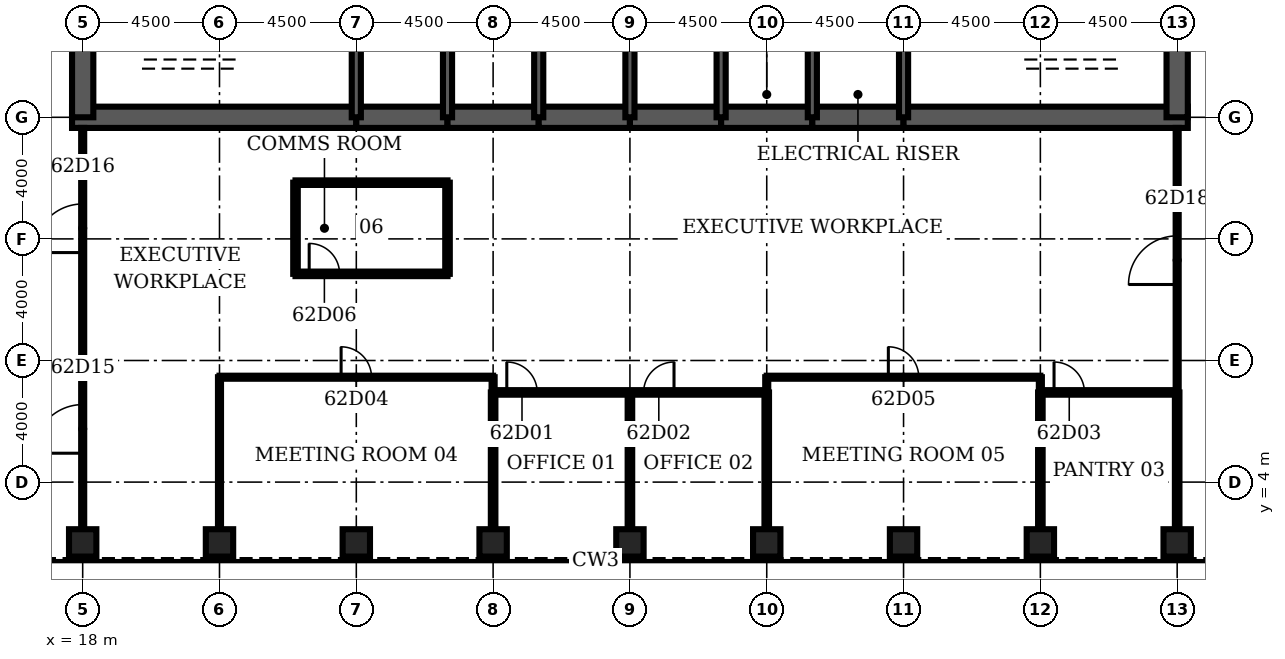
"""IFC4 building model, lengths in metres.
Left out: names, types, materials, properties, quantities, classifications, styles, units other than length and angle.
Written with IfcOpenShell. Run it as: python <this file> out.ifc"""

import sys

from ifc_helpers import new_model, si_unit, direction, frame, frame_2d, origin, origin_2d, place, context, subcontext, project, spatial, rectangle, hollow_rectangle, extrude, element, fill, save


model = new_model("IFC4")
c1 = context("Model", 3, precision=1e-05, world=origin(), true_north=direction((0.0, 1.0)))
c2 = subcontext(c1, "Body", "Model", "MODEL_VIEW")
j1 = project(units=[si_unit("LENGTHUNIT", "METRE"), si_unit("PLANEANGLEUNIT", "RADIAN")], contexts=[c1])
p1 = place(None, origin())
s1 = spatial("IfcSite", under=j1, at=p1, CompositionType="ELEMENT")
p2 = place(p1, origin())
s2 = spatial("IfcBuilding", under=s1, at=p2, CompositionType="ELEMENT")
p3 = place(p2, frame((0.0, 0.0, 275.3)))
s3 = spatial("IfcBuildingStorey", under=s2, at=p3, CompositionType="ELEMENT", Elevation=275.3)
for number, where, z_axis, x_axis in (
    (1, (18.0, 2.0, 0.0), (0.0, 0.0, 1.0), (0.0, 1.0, 0.0)),
    (2, (22.5, 2.0, 0.0), (0.0, 0.0, 1.0), (0.0, 1.0, 0.0)),
    (3, (27.0, 2.0, 0.0), (0.0, 0.0, 1.0), (0.0, 1.0, 0.0)),
    (4, (31.5, 2.0, 0.0), (0.0, 0.0, 1.0), (0.0, 1.0, 0.0)),
    (5, (36.0, 2.0, 0.0), (0.0, 0.0, 1.0), (0.0, 1.0, 0.0)),
    (6, (40.5, 2.0, 0.0), (0.0, 0.0, 1.0), (0.0, 1.0, 0.0)),
    (7, (45.0, 2.0, 0.0), (0.0, 0.0, 1.0), (0.0, 1.0, 0.0)),
    (8, (49.5, 2.0, 0.0), (0.0, 0.0, 1.0), (0.0, 1.0, 0.0)),
    (9, (54.0, 2.0, 0.0), (0.0, 0.0, 1.0), (0.0, 1.0, 0.0)),
):
    element("IfcColumn", number, at=place(p3, frame(where, z_axis=z_axis, x_axis=x_axis)), inside=s3, PredefinedType="COLUMN", context=c2, shape_type="SweptSolid", body=[
        extrude(hollow_rectangle(XDim=0.9, YDim=0.9, WallThickness=0.07, at=origin_2d()), origin(), (0.0, 0.0, 1.0), 4.2),
    ])
p4 = place(p3, frame((17.65, 16.0, 0.0), z_axis=(0.0, 0.0, 1.0), x_axis=(1.0, 0.0, 0.0)))
e10 = element("IfcWall", 10, at=p4, inside=s3, PredefinedType="SHEAR", context=c2, shape_type="SweptSolid", body=[
    extrude(rectangle(XDim=9.35, YDim=0.7, at=frame_2d((4.675, 0.0))), origin(), (0.0, 0.0, 1.0), 4.2),
])
for number, where, z_axis, x_axis in (
    (11, (27.0, 16.0, 0.0), (0.0, 0.0, 1.0), (1.0, 0.0, 0.0)),
    (12, (30.0, 16.0, 0.0), (0.0, 0.0, 1.0), (1.0, 0.0, 0.0)),
    (13, (33.0, 16.0, 0.0), (0.0, 0.0, 1.0), (1.0, 0.0, 0.0)),
    (14, (36.0, 16.0, 0.0), (0.0, 0.0, 1.0), (1.0, 0.0, 0.0)),
    (15, (39.0, 16.0, 0.0), (0.0, 0.0, 1.0), (1.0, 0.0, 0.0)),
    (16, (42.0, 16.0, 0.0), (0.0, 0.0, 1.0), (1.0, 0.0, 0.0)),
):
    element("IfcWall", number, at=place(p3, frame(where, z_axis=z_axis, x_axis=x_axis)), inside=s3, PredefinedType="SHEAR", context=c2, shape_type="SweptSolid", body=[
        extrude(rectangle(XDim=3.0, YDim=0.7, at=frame_2d((1.5, 0.0))), origin(), (0.0, 0.0, 1.0), 4.2),
    ])
p5 = place(p3, frame((45.0, 16.0, 0.0), z_axis=(0.0, 0.0, 1.0), x_axis=(1.0, 0.0, 0.0)))
e17 = element("IfcWall", 17, at=p5, inside=s3, PredefinedType="SHEAR", context=c2, shape_type="SweptSolid", body=[
    extrude(rectangle(XDim=9.35, YDim=0.7, at=frame_2d((4.675, 0.0))), origin(), (0.0, 0.0, 1.0), 4.2),
])
for number, where, z_axis, x_axis in (
    (18, (18.0, 19.2, 0.0), (0.0, 0.0, 1.0), (0.0, -1.0, 0.0)),
    (19, (54.0, 16.0, 0.0), (0.0, 0.0, 1.0), (0.0, 1.0, 0.0)),
):
    element("IfcWall", number, at=place(p3, frame(where, z_axis=z_axis, x_axis=x_axis)), inside=s3, PredefinedType="SHEAR", context=c2, shape_type="SweptSolid", body=[
        extrude(rectangle(XDim=3.2, YDim=0.7, at=frame_2d((1.6, 0.0))), origin(), (0.0, 0.0, 1.0), 4.2),
    ])
for number, where, z_axis, x_axis in (
    (20, (27.0, 16.0, 0.0), (0.0, 0.0, 1.0), (0.0, 1.0, 0.0)),
    (21, (30.0, 16.0, 0.0), (0.0, 0.0, 1.0), (0.0, 1.0, 0.0)),
    (22, (33.0, 16.0, 0.0), (0.0, 0.0, 1.0), (0.0, 1.0, 0.0)),
    (23, (36.0, 16.0, 0.0), (0.0, 0.0, 1.0), (0.0, 1.0, 0.0)),
    (24, (39.0, 16.0, 0.0), (0.0, 0.0, 1.0), (0.0, 1.0, 0.0)),
    (25, (42.0, 16.0, 0.0), (0.0, 0.0, 1.0), (0.0, 1.0, 0.0)),
    (26, (45.0, 16.0, 0.0), (0.0, 0.0, 1.0), (0.0, 1.0, 0.0)),
):
    element("IfcWall", number, at=place(p3, frame(where, z_axis=z_axis, x_axis=x_axis)), inside=s3, PredefinedType="SOLIDWALL", context=c2, shape_type="SweptSolid", body=[
        extrude(rectangle(XDim=3.2, YDim=0.3, at=frame_2d((1.6, 0.0))), origin(), (0.0, 0.0, 1.0), 4.2),
    ])
p6 = place(p3, frame((39.15, 17.3, 0.0), z_axis=(0.0, 0.0, 1.0), x_axis=(1.0, 0.0, 0.0)))
e27 = element("IfcWall", 27, at=p6, inside=s3, PredefinedType="SOLIDWALL", context=c2, shape_type="SweptSolid", body=[
    extrude(rectangle(XDim=2.7, YDim=0.3, at=frame_2d((1.35, 0.0))), origin(), (0.0, 0.0, 1.0), 4.04),
])
p7 = place(p6, frame((0.85, 0.0, 0.0)))
e28 = element("IfcOpeningElement", 28, at=p7, cuts=e27, PredefinedType="OPENING", context=c2, shape_type="SweptSolid", body=[
    extrude(rectangle(XDim=1.0, YDim=2.1, at=frame_2d((0.5, 1.05))), frame((0.0, 0.16, 0.0), z_axis=(0.0, -1.0, 0.0), x_axis=(1.0, 0.0, 0.0)), (0.0, 0.0, 1.0), 0.32),
])
p8 = place(p3, frame((42.15, 17.3, 0.0), z_axis=(0.0, 0.0, 1.0), x_axis=(1.0, 0.0, 0.0)))
e29 = element("IfcWall", 29, at=p8, inside=s3, PredefinedType="SOLIDWALL", context=c2, shape_type="SweptSolid", body=[
    extrude(rectangle(XDim=2.7, YDim=0.3, at=frame_2d((1.35, 0.0))), origin(), (0.0, 0.0, 1.0), 4.04),
])
p9 = place(p8, frame((0.85, 0.0, 0.0)))
e30 = element("IfcOpeningElement", 30, at=p9, cuts=e29, PredefinedType="OPENING", context=c2, shape_type="SweptSolid", body=[
    extrude(rectangle(XDim=1.0, YDim=2.1, at=frame_2d((0.5, 1.05))), frame((0.0, 0.16, 0.0), z_axis=(0.0, -1.0, 0.0), x_axis=(1.0, 0.0, 0.0)), (0.0, 0.0, 1.0), 0.32),
])
p10 = place(p3, frame((31.5, 6.95, 0.0), z_axis=(0.0, 0.0, 1.0), x_axis=(1.0, 0.0, 0.0)))
e31 = element("IfcWall", 31, at=p10, inside=s3, PredefinedType="PARTITIONING", context=c2, shape_type="SweptSolid", body=[
    extrude(rectangle(XDim=9.0, YDim=0.15, at=frame_2d((4.5, 0.0))), origin(), (0.0, 0.0, 1.0), 3.0),
])
p11 = place(p10, frame((0.45, 0.0, 0.0)))
e32 = element("IfcOpeningElement", 32, at=p11, cuts=e31, PredefinedType="OPENING", context=c2, shape_type="SweptSolid", body=[
    extrude(rectangle(XDim=1.0, YDim=2.1, at=frame_2d((0.5, 1.05))), frame((0.0, 0.085, 0.0), z_axis=(0.0, -1.0, 0.0), x_axis=(1.0, 0.0, 0.0)), (0.0, 0.0, 1.0), 0.17),
])
p12 = place(p10, frame((4.95, 0.0, 0.0)))
e33 = element("IfcOpeningElement", 33, at=p12, cuts=e31, PredefinedType="OPENING", context=c2, shape_type="SweptSolid", body=[
    extrude(rectangle(XDim=1.0, YDim=2.1, at=frame_2d((0.5, 1.05))), frame((0.0, 0.085, 0.0), z_axis=(0.0, -1.0, 0.0), x_axis=(1.0, 0.0, 0.0)), (0.0, 0.0, 1.0), 0.17),
])
p13 = place(p3, frame((49.5, 6.95, 0.0), z_axis=(0.0, 0.0, 1.0), x_axis=(1.0, 0.0, 0.0)))
e34 = element("IfcWall", 34, at=p13, inside=s3, PredefinedType="PARTITIONING", context=c2, shape_type="SweptSolid", body=[
    extrude(rectangle(XDim=4.5, YDim=0.15, at=frame_2d((2.25, 0.0))), origin(), (0.0, 0.0, 1.0), 3.0),
])
p14 = place(p13, frame((0.45, 0.0, 0.0)))
e35 = element("IfcOpeningElement", 35, at=p14, cuts=e34, PredefinedType="OPENING", context=c2, shape_type="SweptSolid", body=[
    extrude(rectangle(XDim=1.0, YDim=2.1, at=frame_2d((0.5, 1.05))), frame((0.0, 0.085, 0.0), z_axis=(0.0, -1.0, 0.0), x_axis=(1.0, 0.0, 0.0)), (0.0, 0.0, 1.0), 0.17),
])
p15 = place(p3, frame((22.5, 7.45, 0.0), z_axis=(0.0, 0.0, 1.0), x_axis=(1.0, 0.0, 0.0)))
e36 = element("IfcWall", 36, at=p15, inside=s3, PredefinedType="PARTITIONING", context=c2, shape_type="SweptSolid", body=[
    extrude(rectangle(XDim=9.0, YDim=0.1, at=frame_2d((4.5, 0.0))), origin(), (0.0, 0.0, 1.0), 3.0),
])
p16 = place(p15, frame((4.0, 0.0, 0.0)))
e37 = element("IfcOpeningElement", 37, at=p16, cuts=e36, PredefinedType="OPENING", context=c2, shape_type="SweptSolid", body=[
    extrude(rectangle(XDim=1.0, YDim=2.1, at=frame_2d((0.5, 1.05))), frame((0.0, 0.06, 0.0), z_axis=(0.0, -1.0, 0.0), x_axis=(1.0, 0.0, 0.0)), (0.0, 0.0, 1.0), 0.12),
])
p17 = place(p3, frame((40.5, 7.45, 0.0), z_axis=(0.0, 0.0, 1.0), x_axis=(1.0, 0.0, 0.0)))
e38 = element("IfcWall", 38, at=p17, inside=s3, PredefinedType="PARTITIONING", context=c2, shape_type="SweptSolid", body=[
    extrude(rectangle(XDim=9.0, YDim=0.1, at=frame_2d((4.5, 0.0))), origin(), (0.0, 0.0, 1.0), 3.0),
])
p18 = place(p17, frame((4.0, 0.0, 0.0)))
e39 = element("IfcOpeningElement", 39, at=p18, cuts=e38, PredefinedType="OPENING", context=c2, shape_type="SweptSolid", body=[
    extrude(rectangle(XDim=1.0, YDim=2.1, at=frame_2d((0.5, 1.05))), frame((0.0, 0.06, 0.0), z_axis=(0.0, -1.0, 0.0), x_axis=(1.0, 0.0, 0.0)), (0.0, 0.0, 1.0), 0.12),
])
p19 = place(p3, frame((25.0, 10.85, 0.0), z_axis=(0.0, 0.0, 1.0), x_axis=(1.0, 0.0, 0.0)))
e40 = element("IfcWall", 40, at=p19, inside=s3, PredefinedType="PARTITIONING", context=c2, shape_type="SweptSolid", body=[
    extrude(rectangle(XDim=5.0, YDim=0.15, at=frame_2d((2.5, 0.0))), origin(), (0.0, 0.0, 1.0), 3.0),
])
p20 = place(p19, frame((0.45, 0.0, 0.0)))
e41 = element("IfcOpeningElement", 41, at=p20, cuts=e40, PredefinedType="OPENING", context=c2, shape_type="SweptSolid", body=[
    extrude(rectangle(XDim=1.0, YDim=2.1, at=frame_2d((0.5, 1.05))), frame((0.0, 0.085, 0.0), z_axis=(0.0, -1.0, 0.0), x_axis=(1.0, 0.0, 0.0)), (0.0, 0.0, 1.0), 0.17),
])
p21 = place(p3, frame((25.0, 13.85, 0.0), z_axis=(0.0, 0.0, 1.0), x_axis=(1.0, 0.0, 0.0)))
e42 = element("IfcWall", 42, at=p21, inside=s3, PredefinedType="PARTITIONING", context=c2, shape_type="SweptSolid", body=[
    extrude(rectangle(XDim=5.0, YDim=0.15, at=frame_2d((2.5, 0.0))), origin(), (0.0, 0.0, 1.0), 3.0),
])
p22 = place(p3, frame((18.0, 2.45, 0.0), z_axis=(0.0, 0.0, 1.0), x_axis=(0.0, 1.0, 0.0)))
e43 = element("IfcWall", 43, at=p22, inside=s3, PredefinedType="PARTITIONING", context=c2, shape_type="SweptSolid", body=[
    extrude(rectangle(XDim=13.2, YDim=0.1, at=frame_2d((6.6, 0.0))), origin(), (0.0, 0.0, 1.0), 3.0),
])
p23 = place(p22, frame((2.5, 0.0, 0.0)))
e44 = element("IfcOpeningElement", 44, at=p23, cuts=e43, PredefinedType="OPENING", context=c2, shape_type="SweptSolid", body=[
    extrude(rectangle(XDim=1.6, YDim=2.1, at=frame_2d((0.8, 1.05))), frame((0.0, 0.06, 0.0), z_axis=(0.0, -1.0, 0.0), x_axis=(1.0, 0.0, 0.0)), (0.0, 0.0, 1.0), 0.12),
])
p24 = place(p22, frame((9.1, 0.0, 0.0)))
e45 = element("IfcOpeningElement", 45, at=p24, cuts=e43, PredefinedType="OPENING", context=c2, shape_type="SweptSolid", body=[
    extrude(rectangle(XDim=1.6, YDim=2.1, at=frame_2d((0.8, 1.05))), frame((0.0, 0.06, 0.0), z_axis=(0.0, -1.0, 0.0), x_axis=(1.0, 0.0, 0.0)), (0.0, 0.0, 1.0), 0.12),
])
p25 = place(p3, frame((22.5, 2.45, 0.0), z_axis=(0.0, 0.0, 1.0), x_axis=(0.0, 1.0, 0.0)))
e46 = element("IfcWall", 46, at=p25, inside=s3, PredefinedType="PARTITIONING", context=c2, shape_type="SweptSolid", body=[
    extrude(rectangle(XDim=5.0, YDim=0.1, at=frame_2d((2.5, 0.0))), origin(), (0.0, 0.0, 1.0), 3.0),
])
for number, where, z_axis, x_axis in (
    (47, (25.0, 10.85, 0.0), (0.0, 0.0, 1.0), (0.0, 1.0, 0.0)),
    (48, (30.0, 10.85, 0.0), (0.0, 0.0, 1.0), (0.0, 1.0, 0.0)),
):
    element("IfcWall", number, at=place(p3, frame(where, z_axis=z_axis, x_axis=x_axis)), inside=s3, PredefinedType="PARTITIONING", context=c2, shape_type="SweptSolid", body=[
        extrude(rectangle(XDim=3.0, YDim=0.15, at=frame_2d((1.5, 0.0))), origin(), (0.0, 0.0, 1.0), 3.0),
    ])
p26 = place(p3, frame((31.5, 2.45, 0.0), z_axis=(0.0, 0.0, 1.0), x_axis=(0.0, 1.0, 0.0)))
e49 = element("IfcWall", 49, at=p26, inside=s3, PredefinedType="PARTITIONING", context=c2, shape_type="SweptSolid", body=[
    extrude(rectangle(XDim=4.5, YDim=0.15, at=frame_2d((2.25, 0.0))), origin(), (0.0, 0.0, 1.0), 3.0),
])
p27 = place(p3, frame((31.5, 6.95, 0.0), z_axis=(0.0, 0.0, 1.0), x_axis=(0.0, 1.0, 0.0)))
e50 = element("IfcWall", 50, at=p27, inside=s3, PredefinedType="PARTITIONING", context=c2, shape_type="SweptSolid", body=[
    extrude(rectangle(XDim=0.5, YDim=0.1, at=frame_2d((0.25, 0.0))), origin(), (0.0, 0.0, 1.0), 3.0),
])
for number, where, z_axis, x_axis in (
    (51, (36.0, 2.45, 0.0), (0.0, 0.0, 1.0), (0.0, 1.0, 0.0)),
    (52, (40.5, 2.45, 0.0), (0.0, 0.0, 1.0), (0.0, 1.0, 0.0)),
):
    element("IfcWall", number, at=place(p3, frame(where, z_axis=z_axis, x_axis=x_axis)), inside=s3, PredefinedType="PARTITIONING", context=c2, shape_type="SweptSolid", body=[
        extrude(rectangle(XDim=4.5, YDim=0.15, at=frame_2d((2.25, 0.0))), origin(), (0.0, 0.0, 1.0), 3.0),
    ])
p28 = place(p3, frame((40.5, 6.95, 0.0), z_axis=(0.0, 0.0, 1.0), x_axis=(0.0, 1.0, 0.0)))
e53 = element("IfcWall", 53, at=p28, inside=s3, PredefinedType="PARTITIONING", context=c2, shape_type="SweptSolid", body=[
    extrude(rectangle(XDim=0.5, YDim=0.1, at=frame_2d((0.25, 0.0))), origin(), (0.0, 0.0, 1.0), 3.0),
])
p29 = place(p3, frame((49.5, 2.45, 0.0), z_axis=(0.0, 0.0, 1.0), x_axis=(0.0, 1.0, 0.0)))
e54 = element("IfcWall", 54, at=p29, inside=s3, PredefinedType="PARTITIONING", context=c2, shape_type="SweptSolid", body=[
    extrude(rectangle(XDim=4.5, YDim=0.15, at=frame_2d((2.25, 0.0))), origin(), (0.0, 0.0, 1.0), 3.0),
])
p30 = place(p3, frame((49.5, 6.95, 0.0), z_axis=(0.0, 0.0, 1.0), x_axis=(0.0, 1.0, 0.0)))
e55 = element("IfcWall", 55, at=p30, inside=s3, PredefinedType="PARTITIONING", context=c2, shape_type="SweptSolid", body=[
    extrude(rectangle(XDim=0.5, YDim=0.1, at=frame_2d((0.25, 0.0))), origin(), (0.0, 0.0, 1.0), 3.0),
])
p31 = place(p3, frame((54.0, 2.45, 0.0), z_axis=(0.0, 0.0, 1.0), x_axis=(0.0, 1.0, 0.0)))
e56 = element("IfcWall", 56, at=p31, inside=s3, PredefinedType="PARTITIONING", context=c2, shape_type="SweptSolid", body=[
    extrude(rectangle(XDim=4.5, YDim=0.15, at=frame_2d((2.25, 0.0))), origin(), (0.0, 0.0, 1.0), 3.0),
])
p32 = place(p3, frame((54.0, 6.95, 0.0), z_axis=(0.0, 0.0, 1.0), x_axis=(0.0, 1.0, 0.0)))
e57 = element("IfcWall", 57, at=p32, inside=s3, PredefinedType="PARTITIONING", context=c2, shape_type="SweptSolid", body=[
    extrude(rectangle(XDim=8.7, YDim=0.1, at=frame_2d((4.35, 0.0))), origin(), (0.0, 0.0, 1.0), 3.0),
])
p33 = place(p32, frame((3.55, 0.0, 0.0)))
e58 = element("IfcOpeningElement", 58, at=p33, cuts=e57, PredefinedType="OPENING", context=c2, shape_type="SweptSolid", body=[
    extrude(rectangle(XDim=1.6, YDim=2.1, at=frame_2d((0.8, 1.05))), frame((0.0, 0.06, 0.0), z_axis=(0.0, -1.0, 0.0), x_axis=(1.0, 0.0, 0.0)), (0.0, 0.0, 1.0), 0.12),
])
p34 = place(p7, origin())
e59 = element("IfcDoor", 59, at=p34, inside=s3, OperationType="SINGLE_SWING_LEFT", PredefinedType="DOOR", context=c2, shape_type="SweptSolid", body=[
    extrude(rectangle(XDim=1.0, YDim=2.1, at=frame_2d((0.5, 1.05))), frame((0.0, 0.025, 0.0), z_axis=(0.0, -1.0, 0.0), x_axis=(1.0, 0.0, 0.0)), (0.0, 0.0, 1.0), 0.05),
])
fill(e28, e59)
p35 = place(p9, origin())
e60 = element("IfcDoor", 60, at=p35, inside=s3, OperationType="SINGLE_SWING_LEFT", PredefinedType="DOOR", context=c2, shape_type="SweptSolid", body=[
    extrude(rectangle(XDim=1.0, YDim=2.1, at=frame_2d((0.5, 1.05))), frame((0.0, 0.025, 0.0), z_axis=(0.0, -1.0, 0.0), x_axis=(1.0, 0.0, 0.0)), (0.0, 0.0, 1.0), 0.05),
])
fill(e30, e60)
p36 = place(p11, origin())
e61 = element("IfcDoor", 61, at=p36, inside=s3, OperationType="SINGLE_SWING_LEFT", PredefinedType="DOOR", context=c2, shape_type="SweptSolid", body=[
    extrude(rectangle(XDim=1.0, YDim=2.1, at=frame_2d((0.5, 1.05))), frame((0.0, 0.025, 0.0), z_axis=(0.0, -1.0, 0.0), x_axis=(1.0, 0.0, 0.0)), (0.0, 0.0, 1.0), 0.05),
])
fill(e32, e61)
p37 = place(p12, origin())
e62 = element("IfcDoor", 62, at=p37, inside=s3, OperationType="SINGLE_SWING_RIGHT", PredefinedType="DOOR", context=c2, shape_type="SweptSolid", body=[
    extrude(rectangle(XDim=1.0, YDim=2.1, at=frame_2d((0.5, 1.05))), frame((0.0, 0.025, 0.0), z_axis=(0.0, -1.0, 0.0), x_axis=(1.0, 0.0, 0.0)), (0.0, 0.0, 1.0), 0.05),
])
fill(e33, e62)
p38 = place(p14, origin())
e63 = element("IfcDoor", 63, at=p38, inside=s3, OperationType="SINGLE_SWING_LEFT", PredefinedType="DOOR", context=c2, shape_type="SweptSolid", body=[
    extrude(rectangle(XDim=1.0, YDim=2.1, at=frame_2d((0.5, 1.05))), frame((0.0, 0.025, 0.0), z_axis=(0.0, -1.0, 0.0), x_axis=(1.0, 0.0, 0.0)), (0.0, 0.0, 1.0), 0.05),
])
fill(e35, e63)
p39 = place(p16, origin())
e64 = element("IfcDoor", 64, at=p39, inside=s3, OperationType="SINGLE_SWING_LEFT", PredefinedType="DOOR", context=c2, shape_type="SweptSolid", body=[
    extrude(rectangle(XDim=1.0, YDim=2.1, at=frame_2d((0.5, 1.05))), frame((0.0, 0.025, 0.0), z_axis=(0.0, -1.0, 0.0), x_axis=(1.0, 0.0, 0.0)), (0.0, 0.0, 1.0), 0.05),
])
fill(e37, e64)
p40 = place(p18, origin())
e65 = element("IfcDoor", 65, at=p40, inside=s3, OperationType="SINGLE_SWING_LEFT", PredefinedType="DOOR", context=c2, shape_type="SweptSolid", body=[
    extrude(rectangle(XDim=1.0, YDim=2.1, at=frame_2d((0.5, 1.05))), frame((0.0, 0.025, 0.0), z_axis=(0.0, -1.0, 0.0), x_axis=(1.0, 0.0, 0.0)), (0.0, 0.0, 1.0), 0.05),
])
fill(e39, e65)
p41 = place(p20, origin())
e66 = element("IfcDoor", 66, at=p41, inside=s3, OperationType="SINGLE_SWING_LEFT", PredefinedType="DOOR", context=c2, shape_type="SweptSolid", body=[
    extrude(rectangle(XDim=1.0, YDim=2.1, at=frame_2d((0.5, 1.05))), frame((0.0, 0.025, 0.0), z_axis=(0.0, -1.0, 0.0), x_axis=(1.0, 0.0, 0.0)), (0.0, 0.0, 1.0), 0.05),
])
fill(e41, e66)
p42 = place(p23, origin())
e67 = element("IfcDoor", 67, at=p42, inside=s3, OperationType="SINGLE_SWING_LEFT", PredefinedType="DOOR", context=c2, shape_type="SweptSolid", body=[
    extrude(rectangle(XDim=1.6, YDim=2.1, at=frame_2d((0.8, 1.05))), frame((0.0, 0.025, 0.0), z_axis=(0.0, -1.0, 0.0), x_axis=(1.0, 0.0, 0.0)), (0.0, 0.0, 1.0), 0.05),
])
fill(e44, e67)
p43 = place(p24, origin())
e68 = element("IfcDoor", 68, at=p43, inside=s3, OperationType="SINGLE_SWING_LEFT", PredefinedType="DOOR", context=c2, shape_type="SweptSolid", body=[
    extrude(rectangle(XDim=1.6, YDim=2.1, at=frame_2d((0.8, 1.05))), frame((0.0, 0.025, 0.0), z_axis=(0.0, -1.0, 0.0), x_axis=(1.0, 0.0, 0.0)), (0.0, 0.0, 1.0), 0.05),
])
fill(e45, e68)
p44 = place(p33, origin())
e69 = element("IfcDoor", 69, at=p44, inside=s3, OperationType="SINGLE_SWING_LEFT", PredefinedType="DOOR", context=c2, shape_type="SweptSolid", body=[
    extrude(rectangle(XDim=1.6, YDim=2.1, at=frame_2d((0.8, 1.05))), frame((0.0, 0.025, 0.0), z_axis=(0.0, -1.0, 0.0), x_axis=(1.0, 0.0, 0.0)), (0.0, 0.0, 1.0), 0.05),
])
fill(e58, e69)
save(model, sys.argv[1])
